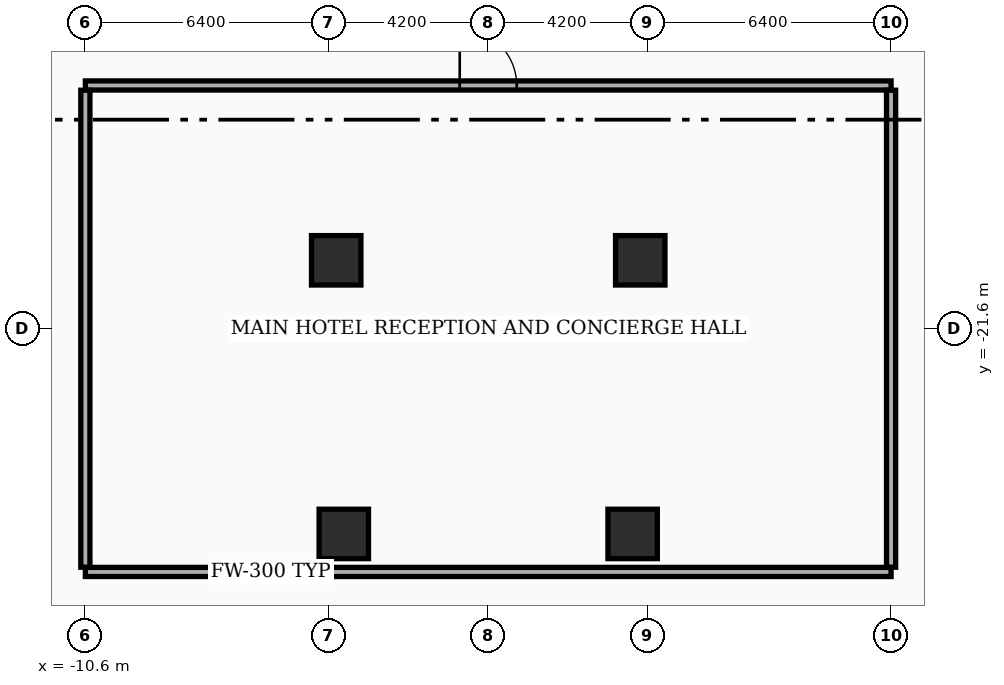
"""IFC4 building model, lengths in metres.
Left out: names, types, materials, properties, quantities, classifications, styles, units other than length and angle.
Written with IfcOpenShell. Run it as: python <this file> out.ifc"""

import sys

from ifc_helpers import new_model, si_unit, direction, frame, frame_2d, origin, origin_2d, place, context, subcontext, project, spatial, rectangle, extrude, element, fill, save


model = new_model("IFC4")
c1 = context("Model", 3, precision=1e-05, world=origin(), true_north=direction((0.0, 1.0)))
c2 = subcontext(c1, "Body", "Model", "MODEL_VIEW")
j1 = project(units=[si_unit("LENGTHUNIT", "METRE"), si_unit("PLANEANGLEUNIT", "RADIAN")], contexts=[c1])
p1 = place(None, origin())
s1 = spatial("IfcSite", under=j1, at=p1, CompositionType="ELEMENT")
p2 = place(p1, origin())
s2 = spatial("IfcBuilding", under=s1, at=p2, CompositionType="ELEMENT")
p3 = place(p2, origin())
s3 = spatial("IfcBuildingStorey", under=s2, at=p3, CompositionType="ELEMENT", Elevation=0.0)
for number, where, z_axis, x_axis in (
    (1, (-4.0, -19.8, 0.0), (0.0, 0.0, 1.0), (1.0, 0.0, 0.0)),
    (2, (4.0, -19.8, 0.0), (0.0, 0.0, 1.0), (1.0, 0.0, 0.0)),
    (3, (-3.8, -27.0, 0.0), (0.0, 0.0, 1.0), (1.0, 0.0, 0.0)),
    (4, (3.8, -27.0, 0.0), (0.0, 0.0, 1.0), (1.0, 0.0, 0.0)),
):
    element("IfcColumn", number, at=place(p3, frame(where, z_axis=z_axis, x_axis=x_axis)), inside=s3, PredefinedType="COLUMN", context=c2, shape_type="SweptSolid", body=[
        extrude(rectangle(XDim=1.3, YDim=1.3, at=origin_2d()), origin(), (0.0, 0.0, 1.0), 5.4),
    ])
p4 = place(p3, frame((-10.6, -28.0, 0.0), z_axis=(0.0, 0.0, 1.0), x_axis=(1.0, 0.0, 0.0)))
e5 = element("IfcWall", 5, at=p4, inside=s3, PredefinedType="SOLIDWALL", context=c2, shape_type="SweptSolid", body=[
    extrude(rectangle(XDim=21.2, YDim=0.24, at=frame_2d((10.6, 0.0))), origin(), (0.0, 0.0, 1.0), 2.67),
])
p5 = place(p3, frame((-10.6, -15.2, 0.0), z_axis=(0.0, 0.0, 1.0), x_axis=(1.0, 0.0, 0.0)))
e6 = element("IfcWall", 6, at=p5, inside=s3, PredefinedType="SOLIDWALL", context=c2, shape_type="SweptSolid", body=[
    extrude(rectangle(XDim=21.2, YDim=0.24, at=frame_2d((10.6, 0.0))), origin(), (0.0, 0.0, 1.0), 2.67),
])
p6 = place(p5, frame((9.85, 0.0, 0.0)))
e7 = element("IfcOpeningElement", 7, at=p6, cuts=e6, PredefinedType="OPENING", context=c2, shape_type="SweptSolid", body=[
    extrude(rectangle(XDim=1.5, YDim=2.15, at=frame_2d((0.75, 1.075))), frame((0.0, 0.13, 0.0), z_axis=(0.0, -1.0, 0.0), x_axis=(1.0, 0.0, 0.0)), (0.0, 0.0, 1.0), 0.26),
])
for number, where, z_axis, x_axis in (
    (8, (-10.6, -27.875, 0.0), (0.0, 0.0, 1.0), (0.0, 1.0, 0.0)),
    (9, (10.6, -27.875, 0.0), (0.0, 0.0, 1.0), (0.0, 1.0, 0.0)),
):
    element("IfcWall", number, at=place(p3, frame(where, z_axis=z_axis, x_axis=x_axis)), inside=s3, PredefinedType="SOLIDWALL", context=c2, shape_type="SweptSolid", body=[
        extrude(rectangle(XDim=12.55, YDim=0.24, at=frame_2d((6.275, 0.0))), origin(), (0.0, 0.0, 1.0), 2.67),
    ])
p7 = place(p6, origin())
e10 = element("IfcDoor", 10, at=p7, inside=s3, OperationType="DOUBLE_DOOR_SINGLE_SWING", PredefinedType="DOOR", context=c2, shape_type="SweptSolid", body=[
    extrude(rectangle(XDim=1.5, YDim=2.15, at=frame_2d((0.75, 1.075))), frame((0.0, 0.025, 0.0), z_axis=(0.0, -1.0, 0.0), x_axis=(1.0, 0.0, 0.0)), (0.0, 0.0, 1.0), 0.05),
])
fill(e7, e10)
save(model, sys.argv[1])
